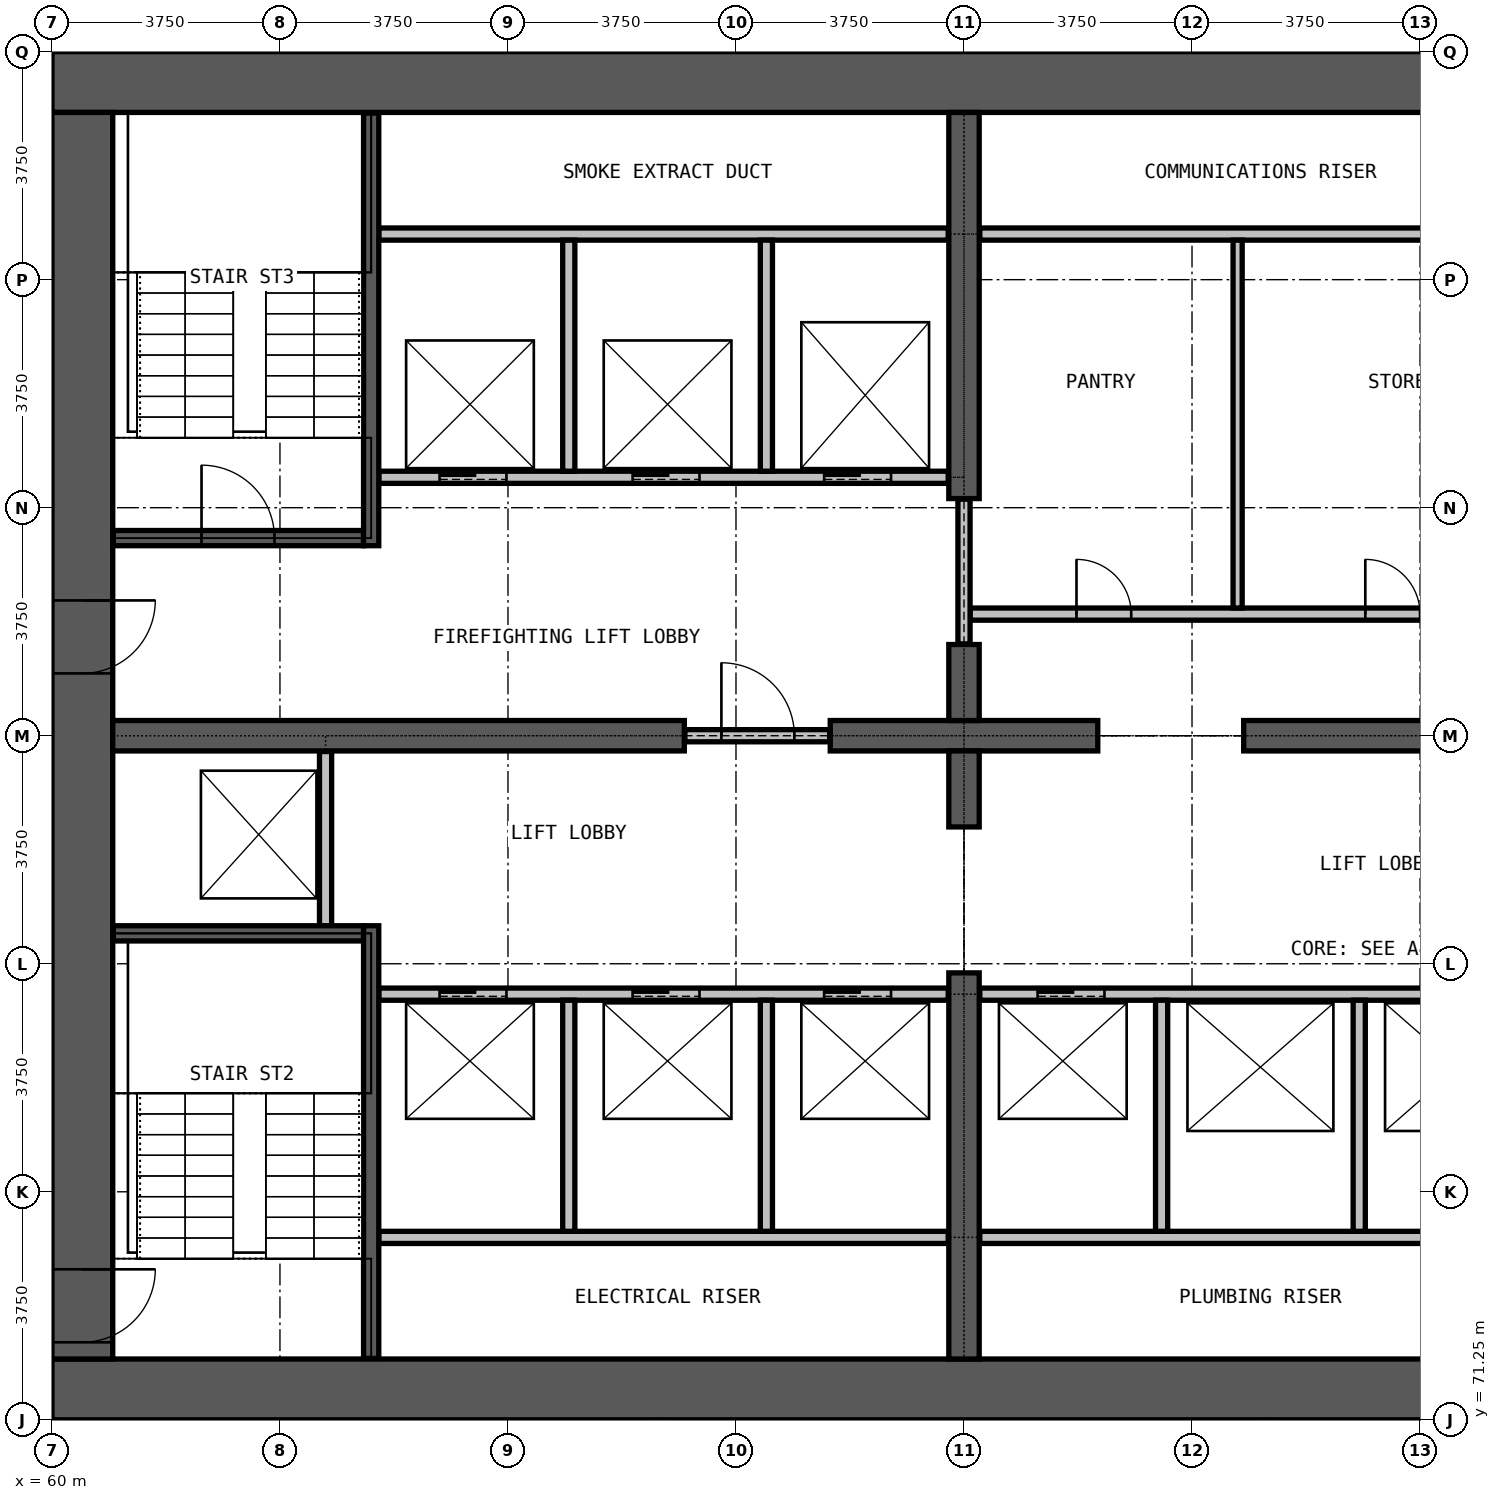
"""IFC4 building model, lengths in metres.
Left out: names, types, materials, properties, quantities, classifications, styles, units other than length and angle.
Written with IfcOpenShell. Run it as: python <this file> out.ifc"""

import sys

from ifc_helpers import new_model, si_unit, direction, frame, frame_2d, origin, place, context, subcontext, project, spatial, rectangle, extrude, element, fill, save


model = new_model("IFC4")
c1 = context("Model", 3, precision=1e-05, world=origin(), true_north=direction((0.0, 1.0)))
c2 = subcontext(c1, "Body", "Model", "MODEL_VIEW")
j1 = project(units=[si_unit("LENGTHUNIT", "METRE"), si_unit("PLANEANGLEUNIT", "RADIAN")], contexts=[c1])
p1 = place(None, origin())
s1 = spatial("IfcSite", under=j1, at=p1, CompositionType="ELEMENT")
p2 = place(p1, origin())
s2 = spatial("IfcBuilding", under=s1, at=p2, CompositionType="ELEMENT")
p3 = place(p2, frame((0.0, 0.0, 30.0)))
s3 = spatial("IfcBuildingStorey", under=s2, at=p3, CompositionType="ELEMENT", Elevation=30.0)
for number, where, z_axis, x_axis in (
    (1, (60.0, 71.75, 0.0), (0.0, 0.0, 1.0), (1.0, 0.0, 0.0)),
    (2, (90.0, 93.25, 0.0), (0.0, 0.0, 1.0), (-1.0, 0.0, 0.0)),
):
    element("IfcWall", number, at=place(p3, frame(where, z_axis=z_axis, x_axis=x_axis)), inside=s3, PredefinedType="SHEAR", context=c2, shape_type="SweptSolid", body=[
        extrude(rectangle(XDim=30.0, YDim=1.0, at=frame_2d((15.0, 0.0))), origin(), (0.0, 0.0, 1.0), 5.0),
    ])
p4 = place(p3, frame((60.5, 92.75, 0.0), z_axis=(0.0, 0.0, 1.0), x_axis=(0.0, -1.0, 0.0)))
e3 = element("IfcWall", 3, at=p4, inside=s3, PredefinedType="SHEAR", context=c2, shape_type="SweptSolid", body=[
    extrude(rectangle(XDim=20.5, YDim=1.0, at=frame_2d((10.25, 0.0))), origin(), (0.0, 0.0, 1.0), 5.0),
])
p5 = place(p4, frame((19.025, 0.0, 0.0)))
e4 = element("IfcOpeningElement", 4, at=p5, cuts=e3, PredefinedType="OPENING", context=c2, shape_type="SweptSolid", body=[
    extrude(rectangle(XDim=1.2, YDim=2.2, at=frame_2d((0.6, 1.1))), frame((0.0, 0.51, 0.0), z_axis=(0.0, -1.0, 0.0), x_axis=(1.0, 0.0, 0.0)), (0.0, 0.0, 1.0), 1.02),
])
p6 = place(p4, frame((8.025, 0.0, 0.0)))
e5 = element("IfcOpeningElement", 5, at=p6, cuts=e3, PredefinedType="OPENING", context=c2, shape_type="SweptSolid", body=[
    extrude(rectangle(XDim=1.2, YDim=2.2, at=frame_2d((0.6, 1.1))), frame((0.0, 0.51, 0.0), z_axis=(0.0, -1.0, 0.0), x_axis=(1.0, 0.0, 0.0)), (0.0, 0.0, 1.0), 1.02),
])
p7 = place(p3, frame((61.0, 82.5, 0.0), z_axis=(0.0, 0.0, 1.0), x_axis=(1.0, 0.0, 0.0)))
e6 = element("IfcWall", 6, at=p7, inside=s3, PredefinedType="SHEAR", context=c2, shape_type="SweptSolid", body=[
    extrude(rectangle(XDim=9.4, YDim=0.5, at=frame_2d((4.7, 0.0))), origin(), (0.0, 0.0, 1.0), 5.0),
])
p8 = place(p3, frame((72.8, 82.5, 0.0), z_axis=(0.0, 0.0, 1.0), x_axis=(1.0, 0.0, 0.0)))
e7 = element("IfcWall", 7, at=p8, inside=s3, PredefinedType="SHEAR", context=c2, shape_type="SweptSolid", body=[
    extrude(rectangle(XDim=4.4, YDim=0.5, at=frame_2d((2.2, 0.0))), origin(), (0.0, 0.0, 1.0), 5.0),
])
p9 = place(p3, frame((79.6, 82.5, 0.0), z_axis=(0.0, 0.0, 1.0), x_axis=(1.0, 0.0, 0.0)))
e8 = element("IfcWall", 8, at=p9, inside=s3, PredefinedType="SHEAR", context=c2, shape_type="SweptSolid", body=[
    extrude(rectangle(XDim=9.4, YDim=0.5, at=frame_2d((4.7, 0.0))), origin(), (0.0, 0.0, 1.0), 5.0),
])
p10 = place(p3, frame((75.0, 72.25, 0.0), z_axis=(0.0, 0.0, 1.0), x_axis=(0.0, 1.0, 0.0)))
e9 = element("IfcWall", 9, at=p10, inside=s3, PredefinedType="SHEAR", context=c2, shape_type="SweptSolid", body=[
    extrude(rectangle(XDim=6.35, YDim=0.5, at=frame_2d((3.175, 0.0))), origin(), (0.0, 0.0, 1.0), 5.0),
])
for number, where, z_axis, x_axis in (
    (10, (75.0, 81.0, 0.0), (0.0, 0.0, 1.0), (0.0, 1.0, 0.0)),
    (11, (75.0, 82.75, 0.0), (0.0, 0.0, 1.0), (0.0, 1.0, 0.0)),
):
    element("IfcWall", number, at=place(p3, frame(where, z_axis=z_axis, x_axis=x_axis)), inside=s3, PredefinedType="SHEAR", context=c2, shape_type="SweptSolid", body=[
        extrude(rectangle(XDim=1.25, YDim=0.5, at=frame_2d((0.625, 0.0))), origin(), (0.0, 0.0, 1.0), 5.0),
    ])
p11 = place(p3, frame((75.0, 86.4, 0.0), z_axis=(0.0, 0.0, 1.0), x_axis=(0.0, 1.0, 0.0)))
e12 = element("IfcWall", 12, at=p11, inside=s3, PredefinedType="SHEAR", context=c2, shape_type="SweptSolid", body=[
    extrude(rectangle(XDim=6.35, YDim=0.5, at=frame_2d((3.175, 0.0))), origin(), (0.0, 0.0, 1.0), 5.0),
])
p12 = place(p3, frame((70.41, 82.5, 0.0), z_axis=(0.0, 0.0, 1.0), x_axis=(1.0, 0.0, 0.0)))
e13 = element("IfcWall", 13, at=p12, inside=s3, PredefinedType="PARTITIONING", context=c2, shape_type="SweptSolid", body=[
    extrude(rectangle(XDim=2.38, YDim=0.2, at=frame_2d((1.19, 0.0))), origin(), (0.0, 0.0, 1.0), 2.4),
])
p13 = place(p12, frame((0.6, 0.0, 0.0)))
e14 = element("IfcOpeningElement", 14, at=p13, cuts=e13, PredefinedType="OPENING", context=c2, shape_type="SweptSolid", body=[
    extrude(rectangle(XDim=1.2, YDim=2.2, at=frame_2d((0.6, 1.1))), frame((0.0, 0.11, 0.0), z_axis=(0.0, -1.0, 0.0), x_axis=(1.0, 0.0, 0.0)), (0.0, 0.0, 1.0), 0.22),
])
p14 = place(p3, frame((75.1, 84.5, 0.0), z_axis=(0.0, 0.0, 1.0), x_axis=(1.0, 0.0, 0.0)))
e15 = element("IfcWall", 15, at=p14, inside=s3, PredefinedType="PARTITIONING", context=c2, shape_type="SweptSolid", body=[
    extrude(rectangle(XDim=9.55, YDim=0.2, at=frame_2d((4.775, 0.0))), origin(), (0.0, 0.0, 1.0), 4.7),
])
p15 = place(p14, frame((1.75, 0.0, 0.0)))
e16 = element("IfcOpeningElement", 16, at=p15, cuts=e15, PredefinedType="OPENING", context=c2, shape_type="SweptSolid", body=[
    extrude(rectangle(XDim=0.9, YDim=2.2, at=frame_2d((0.45, 1.1))), frame((0.0, 0.11, 0.0), z_axis=(0.0, -1.0, 0.0), x_axis=(1.0, 0.0, 0.0)), (0.0, 0.0, 1.0), 0.22),
])
p16 = place(p14, frame((6.5, 0.0, 0.0)))
e17 = element("IfcOpeningElement", 17, at=p16, cuts=e15, PredefinedType="OPENING", context=c2, shape_type="SweptSolid", body=[
    extrude(rectangle(XDim=0.9, YDim=2.2, at=frame_2d((0.45, 1.1))), frame((0.0, 0.11, 0.0), z_axis=(0.0, -1.0, 0.0), x_axis=(1.0, 0.0, 0.0)), (0.0, 0.0, 1.0), 0.22),
])
p17 = place(p3, frame((75.26, 90.75, 0.0), z_axis=(0.0, 0.0, 1.0), x_axis=(1.0, 0.0, 0.0)))
e18 = element("IfcWall", 18, at=p17, inside=s3, PredefinedType="PARTITIONING", context=c2, shape_type="SweptSolid", body=[
    extrude(rectangle(XDim=9.365, YDim=0.2, at=frame_2d((4.683, 0.0))), origin(), (0.0, 0.0, 1.0), 4.7),
])
p18 = place(p3, frame((75.0, 84.01, 0.0), z_axis=(0.0, 0.0, 1.0), x_axis=(0.0, 1.0, 0.0)))
e19 = element("IfcWall", 19, at=p18, inside=s3, PredefinedType="PARTITIONING", context=c2, shape_type="SweptSolid", body=[
    extrude(rectangle(XDim=2.38, YDim=0.2, at=frame_2d((1.19, 0.0))), origin(), (0.0, 0.0, 1.0), 2.4),
])
p19 = place(p3, frame((79.5, 84.6, 0.0), z_axis=(0.0, 0.0, 1.0), x_axis=(0.0, 1.0, 0.0)))
e20 = element("IfcWall", 20, at=p19, inside=s3, PredefinedType="PARTITIONING", context=c2, shape_type="SweptSolid", body=[
    extrude(rectangle(XDim=6.05, YDim=0.15, at=frame_2d((3.025, 0.0))), origin(), (0.0, 0.0, 1.0), 4.7),
])
for number, where, z_axis, x_axis in (
    (21, (65.375, 74.25, 0.0), (0.0, 0.0, 1.0), (1.0, 0.0, 0.0)),
    (22, (75.26, 74.25, 0.0), (0.0, 0.0, 1.0), (1.0, 0.0, 0.0)),
):
    element("IfcWall", number, at=place(p3, frame(where, z_axis=z_axis, x_axis=x_axis)), inside=s3, PredefinedType="PARTITIONING", context=c2, shape_type="SweptSolid", body=[
        extrude(rectangle(XDim=9.365, YDim=0.2, at=frame_2d((4.683, 0.0))), origin(), (0.0, 0.0, 1.0), 4.7),
    ])
p20 = place(p3, frame((65.375, 78.25, 0.0), z_axis=(0.0, 0.0, 1.0), x_axis=(1.0, 0.0, 0.0)))
e23 = element("IfcWall", 23, at=p20, inside=s3, PredefinedType="PARTITIONING", context=c2, shape_type="SweptSolid", body=[
    extrude(rectangle(XDim=9.365, YDim=0.2, at=frame_2d((4.683, 0.0))), origin(), (0.0, 0.0, 1.0), 4.7),
])
p21 = place(p20, frame((1.0, 0.0, 0.0)))
e24 = element("IfcOpeningElement", 24, at=p21, cuts=e23, PredefinedType="OPENING", context=c2, shape_type="SweptSolid", body=[
    extrude(rectangle(XDim=1.1, YDim=2.2, at=frame_2d((0.55, 1.1))), frame((0.0, 0.11, 0.0), z_axis=(0.0, -1.0, 0.0), x_axis=(1.0, 0.0, 0.0)), (0.0, 0.0, 1.0), 0.22),
])
p22 = place(p20, frame((4.175, 0.0, 0.0)))
e25 = element("IfcOpeningElement", 25, at=p22, cuts=e23, PredefinedType="OPENING", context=c2, shape_type="SweptSolid", body=[
    extrude(rectangle(XDim=1.1, YDim=2.2, at=frame_2d((0.55, 1.1))), frame((0.0, 0.11, 0.0), z_axis=(0.0, -1.0, 0.0), x_axis=(1.0, 0.0, 0.0)), (0.0, 0.0, 1.0), 0.22),
])
p23 = place(p20, frame((7.325, 0.0, 0.0)))
e26 = element("IfcOpeningElement", 26, at=p23, cuts=e23, PredefinedType="OPENING", context=c2, shape_type="SweptSolid", body=[
    extrude(rectangle(XDim=1.1, YDim=2.2, at=frame_2d((0.55, 1.1))), frame((0.0, 0.11, 0.0), z_axis=(0.0, -1.0, 0.0), x_axis=(1.0, 0.0, 0.0)), (0.0, 0.0, 1.0), 0.22),
])
p24 = place(p3, frame((75.26, 78.25, 0.0), z_axis=(0.0, 0.0, 1.0), x_axis=(1.0, 0.0, 0.0)))
e27 = element("IfcWall", 27, at=p24, inside=s3, PredefinedType="PARTITIONING", context=c2, shape_type="SweptSolid", body=[
    extrude(rectangle(XDim=9.365, YDim=0.2, at=frame_2d((4.683, 0.0))), origin(), (0.0, 0.0, 1.0), 4.7),
])
p25 = place(p24, frame((0.95, 0.0, 0.0)))
e28 = element("IfcOpeningElement", 28, at=p25, cuts=e27, PredefinedType="OPENING", context=c2, shape_type="SweptSolid", body=[
    extrude(rectangle(XDim=1.1, YDim=2.2, at=frame_2d((0.55, 1.1))), frame((0.0, 0.11, 0.0), z_axis=(0.0, -1.0, 0.0), x_axis=(1.0, 0.0, 0.0)), (0.0, 0.0, 1.0), 0.22),
])
p26 = place(p3, frame((65.375, 86.75, 0.0), z_axis=(0.0, 0.0, 1.0), x_axis=(1.0, 0.0, 0.0)))
e29 = element("IfcWall", 29, at=p26, inside=s3, PredefinedType="PARTITIONING", context=c2, shape_type="SweptSolid", body=[
    extrude(rectangle(XDim=9.365, YDim=0.2, at=frame_2d((4.683, 0.0))), origin(), (0.0, 0.0, 1.0), 4.7),
])
p27 = place(p26, frame((1.0, 0.0, 0.0)))
e30 = element("IfcOpeningElement", 30, at=p27, cuts=e29, PredefinedType="OPENING", context=c2, shape_type="SweptSolid", body=[
    extrude(rectangle(XDim=1.1, YDim=2.2, at=frame_2d((0.55, 1.1))), frame((0.0, 0.11, 0.0), z_axis=(0.0, -1.0, 0.0), x_axis=(1.0, 0.0, 0.0)), (0.0, 0.0, 1.0), 0.22),
])
p28 = place(p26, frame((4.175, 0.0, 0.0)))
e31 = element("IfcOpeningElement", 31, at=p28, cuts=e29, PredefinedType="OPENING", context=c2, shape_type="SweptSolid", body=[
    extrude(rectangle(XDim=1.1, YDim=2.2, at=frame_2d((0.55, 1.1))), frame((0.0, 0.11, 0.0), z_axis=(0.0, -1.0, 0.0), x_axis=(1.0, 0.0, 0.0)), (0.0, 0.0, 1.0), 0.22),
])
p29 = place(p26, frame((7.325, 0.0, 0.0)))
e32 = element("IfcOpeningElement", 32, at=p29, cuts=e29, PredefinedType="OPENING", context=c2, shape_type="SweptSolid", body=[
    extrude(rectangle(XDim=1.1, YDim=2.2, at=frame_2d((0.55, 1.1))), frame((0.0, 0.11, 0.0), z_axis=(0.0, -1.0, 0.0), x_axis=(1.0, 0.0, 0.0)), (0.0, 0.0, 1.0), 0.22),
])
p30 = place(p3, frame((65.375, 90.75, 0.0), z_axis=(0.0, 0.0, 1.0), x_axis=(1.0, 0.0, 0.0)))
e33 = element("IfcWall", 33, at=p30, inside=s3, PredefinedType="PARTITIONING", context=c2, shape_type="SweptSolid", body=[
    extrude(rectangle(XDim=9.365, YDim=0.2, at=frame_2d((4.683, 0.0))), origin(), (0.0, 0.0, 1.0), 4.7),
])
p31 = place(p3, frame((64.5, 79.375, 0.0), z_axis=(0.0, 0.0, 1.0), x_axis=(0.0, 1.0, 0.0)))
e34 = element("IfcWall", 34, at=p31, inside=s3, PredefinedType="PARTITIONING", context=c2, shape_type="SweptSolid", body=[
    extrude(rectangle(XDim=2.865, YDim=0.2, at=frame_2d((1.433, 0.0))), origin(), (0.0, 0.0, 1.0), 4.7),
])
for number, where, z_axis, x_axis in (
    (35, (68.5, 74.35, 0.0), (0.0, 0.0, 1.0), (0.0, 1.0, 0.0)),
    (36, (68.5, 86.85, 0.0), (0.0, 0.0, 1.0), (0.0, 1.0, 0.0)),
    (37, (71.75, 74.35, 0.0), (0.0, 0.0, 1.0), (0.0, 1.0, 0.0)),
    (38, (71.75, 86.85, 0.0), (0.0, 0.0, 1.0), (0.0, 1.0, 0.0)),
    (39, (78.25, 74.35, 0.0), (0.0, 0.0, 1.0), (0.0, 1.0, 0.0)),
    (40, (81.5, 74.35, 0.0), (0.0, 0.0, 1.0), (0.0, 1.0, 0.0)),
):
    element("IfcWall", number, at=place(p3, frame(where, z_axis=z_axis, x_axis=x_axis)), inside=s3, PredefinedType="PARTITIONING", context=c2, shape_type="SweptSolid", body=[
        extrude(rectangle(XDim=3.8, YDim=0.2, at=frame_2d((1.9, 0.0))), origin(), (0.0, 0.0, 1.0), 4.7),
    ])
p32 = place(p3, frame((61.01, 79.25, 0.0), z_axis=(0.0, 0.0, 1.0), x_axis=(1.0, 0.0, 0.0)))
e41 = element("IfcWall", 41, at=p32, inside=s3, PredefinedType="PARTITIONING", context=c2, shape_type="SweptSolid", body=[
    extrude(rectangle(XDim=4.115, YDim=0.25, at=frame_2d((2.058, 0.0))), origin(), (0.0, 0.0, 1.0), 4.7),
])
p33 = place(p3, frame((61.01, 85.75, 0.0), z_axis=(0.0, 0.0, 1.0), x_axis=(1.0, 0.0, 0.0)))
e42 = element("IfcWall", 42, at=p33, inside=s3, PredefinedType="PARTITIONING", context=c2, shape_type="SweptSolid", body=[
    extrude(rectangle(XDim=4.115, YDim=0.25, at=frame_2d((2.058, 0.0))), origin(), (0.0, 0.0, 1.0), 4.7),
])
p34 = place(p33, frame((1.45, 0.0, 0.0)))
e43 = element("IfcOpeningElement", 43, at=p34, cuts=e42, PredefinedType="OPENING", context=c2, shape_type="SweptSolid", body=[
    extrude(rectangle(XDim=1.2, YDim=2.2, at=frame_2d((0.6, 1.1))), frame((0.0, 0.135, 0.0), z_axis=(0.0, -1.0, 0.0), x_axis=(1.0, 0.0, 0.0)), (0.0, 0.0, 1.0), 0.27),
])
for number, where, z_axis, x_axis in (
    (44, (65.25, 72.26, 0.0), (0.0, 0.0, 1.0), (0.0, 1.0, 0.0)),
    (45, (65.25, 85.625, 0.0), (0.0, 0.0, 1.0), (0.0, 1.0, 0.0)),
):
    element("IfcWall", number, at=place(p3, frame(where, z_axis=z_axis, x_axis=x_axis)), inside=s3, PredefinedType="PARTITIONING", context=c2, shape_type="SweptSolid", body=[
        extrude(rectangle(XDim=7.115, YDim=0.25, at=frame_2d((3.558, 0.0))), origin(), (0.0, 0.0, 1.0), 4.7),
    ])
p35 = place(p21, origin())
e46 = element("IfcDoor", 46, at=p35, inside=s3, OperationType="DOUBLE_DOOR_SLIDING", PredefinedType="DOOR", context=c2, shape_type="SweptSolid", body=[
    extrude(rectangle(XDim=1.1, YDim=2.2, at=frame_2d((0.55, 1.1))), frame((0.0, 0.025, 0.0), z_axis=(0.0, -1.0, 0.0), x_axis=(1.0, 0.0, 0.0)), (0.0, 0.0, 1.0), 0.05),
])
fill(e24, e46)
p36 = place(p22, origin())
e47 = element("IfcDoor", 47, at=p36, inside=s3, OperationType="DOUBLE_DOOR_SLIDING", PredefinedType="DOOR", context=c2, shape_type="SweptSolid", body=[
    extrude(rectangle(XDim=1.1, YDim=2.2, at=frame_2d((0.55, 1.1))), frame((0.0, 0.025, 0.0), z_axis=(0.0, -1.0, 0.0), x_axis=(1.0, 0.0, 0.0)), (0.0, 0.0, 1.0), 0.05),
])
fill(e25, e47)
p37 = place(p23, origin())
e48 = element("IfcDoor", 48, at=p37, inside=s3, OperationType="DOUBLE_DOOR_SLIDING", PredefinedType="DOOR", context=c2, shape_type="SweptSolid", body=[
    extrude(rectangle(XDim=1.1, YDim=2.2, at=frame_2d((0.55, 1.1))), frame((0.0, 0.025, 0.0), z_axis=(0.0, -1.0, 0.0), x_axis=(1.0, 0.0, 0.0)), (0.0, 0.0, 1.0), 0.05),
])
fill(e26, e48)
p38 = place(p25, origin())
e49 = element("IfcDoor", 49, at=p38, inside=s3, OperationType="DOUBLE_DOOR_SLIDING", PredefinedType="DOOR", context=c2, shape_type="SweptSolid", body=[
    extrude(rectangle(XDim=1.1, YDim=2.2, at=frame_2d((0.55, 1.1))), frame((0.0, 0.025, 0.0), z_axis=(0.0, -1.0, 0.0), x_axis=(1.0, 0.0, 0.0)), (0.0, 0.0, 1.0), 0.05),
])
fill(e28, e49)
p39 = place(p27, origin())
e50 = element("IfcDoor", 50, at=p39, inside=s3, OperationType="DOUBLE_DOOR_SLIDING", PredefinedType="DOOR", context=c2, shape_type="SweptSolid", body=[
    extrude(rectangle(XDim=1.1, YDim=2.2, at=frame_2d((0.55, 1.1))), frame((0.0, 0.025, 0.0), z_axis=(0.0, -1.0, 0.0), x_axis=(1.0, 0.0, 0.0)), (0.0, 0.0, 1.0), 0.05),
])
fill(e30, e50)
p40 = place(p28, origin())
e51 = element("IfcDoor", 51, at=p40, inside=s3, OperationType="DOUBLE_DOOR_SLIDING", PredefinedType="DOOR", context=c2, shape_type="SweptSolid", body=[
    extrude(rectangle(XDim=1.1, YDim=2.2, at=frame_2d((0.55, 1.1))), frame((0.0, 0.025, 0.0), z_axis=(0.0, -1.0, 0.0), x_axis=(1.0, 0.0, 0.0)), (0.0, 0.0, 1.0), 0.05),
])
fill(e31, e51)
p41 = place(p29, origin())
e52 = element("IfcDoor", 52, at=p41, inside=s3, OperationType="DOUBLE_DOOR_SLIDING", PredefinedType="DOOR", context=c2, shape_type="SweptSolid", body=[
    extrude(rectangle(XDim=1.1, YDim=2.2, at=frame_2d((0.55, 1.1))), frame((0.0, 0.025, 0.0), z_axis=(0.0, -1.0, 0.0), x_axis=(1.0, 0.0, 0.0)), (0.0, 0.0, 1.0), 0.05),
])
fill(e32, e52)
p42 = place(p13, origin())
e53 = element("IfcDoor", 53, at=p42, inside=s3, OperationType="SINGLE_SWING_RIGHT", PredefinedType="DOOR", context=c2, shape_type="SweptSolid", body=[
    extrude(rectangle(XDim=1.2, YDim=2.2, at=frame_2d((0.6, 1.1))), frame((0.0, 0.025, 0.0), z_axis=(0.0, -1.0, 0.0), x_axis=(1.0, 0.0, 0.0)), (0.0, 0.0, 1.0), 0.05),
])
fill(e14, e53)
p43 = place(p34, origin())
e54 = element("IfcDoor", 54, at=p43, inside=s3, OperationType="SINGLE_SWING_RIGHT", PredefinedType="DOOR", context=c2, shape_type="SweptSolid", body=[
    extrude(rectangle(XDim=1.2, YDim=2.2, at=frame_2d((0.6, 1.1))), frame((0.0, 0.025, 0.0), z_axis=(0.0, -1.0, 0.0), x_axis=(1.0, 0.0, 0.0)), (0.0, 0.0, 1.0), 0.05),
])
fill(e43, e54)
p44 = place(p5, origin())
e55 = element("IfcDoor", 55, at=p44, inside=s3, OperationType="SINGLE_SWING_RIGHT", PredefinedType="DOOR", context=c2, shape_type="SweptSolid", body=[
    extrude(rectangle(XDim=1.2, YDim=2.2, at=frame_2d((0.6, 1.1))), frame((0.0, 0.025, 0.0), z_axis=(0.0, -1.0, 0.0), x_axis=(1.0, 0.0, 0.0)), (0.0, 0.0, 1.0), 0.05),
])
fill(e4, e55)
p45 = place(p6, origin())
e56 = element("IfcDoor", 56, at=p45, inside=s3, OperationType="SINGLE_SWING_LEFT", PredefinedType="DOOR", context=c2, shape_type="SweptSolid", body=[
    extrude(rectangle(XDim=1.2, YDim=2.2, at=frame_2d((0.6, 1.1))), frame((0.0, 0.025, 0.0), z_axis=(0.0, -1.0, 0.0), x_axis=(1.0, 0.0, 0.0)), (0.0, 0.0, 1.0), 0.05),
])
fill(e5, e56)
p46 = place(p15, origin())
e57 = element("IfcDoor", 57, at=p46, inside=s3, OperationType="SINGLE_SWING_LEFT", PredefinedType="DOOR", context=c2, shape_type="SweptSolid", body=[
    extrude(rectangle(XDim=0.9, YDim=2.2, at=frame_2d((0.45, 1.1))), frame((0.0, 0.025, 0.0), z_axis=(0.0, -1.0, 0.0), x_axis=(1.0, 0.0, 0.0)), (0.0, 0.0, 1.0), 0.05),
])
fill(e16, e57)
p47 = place(p16, origin())
e58 = element("IfcDoor", 58, at=p47, inside=s3, OperationType="SINGLE_SWING_LEFT", PredefinedType="DOOR", context=c2, shape_type="SweptSolid", body=[
    extrude(rectangle(XDim=0.9, YDim=2.2, at=frame_2d((0.45, 1.1))), frame((0.0, 0.025, 0.0), z_axis=(0.0, -1.0, 0.0), x_axis=(1.0, 0.0, 0.0)), (0.0, 0.0, 1.0), 0.05),
])
fill(e17, e58)
save(model, sys.argv[1])
